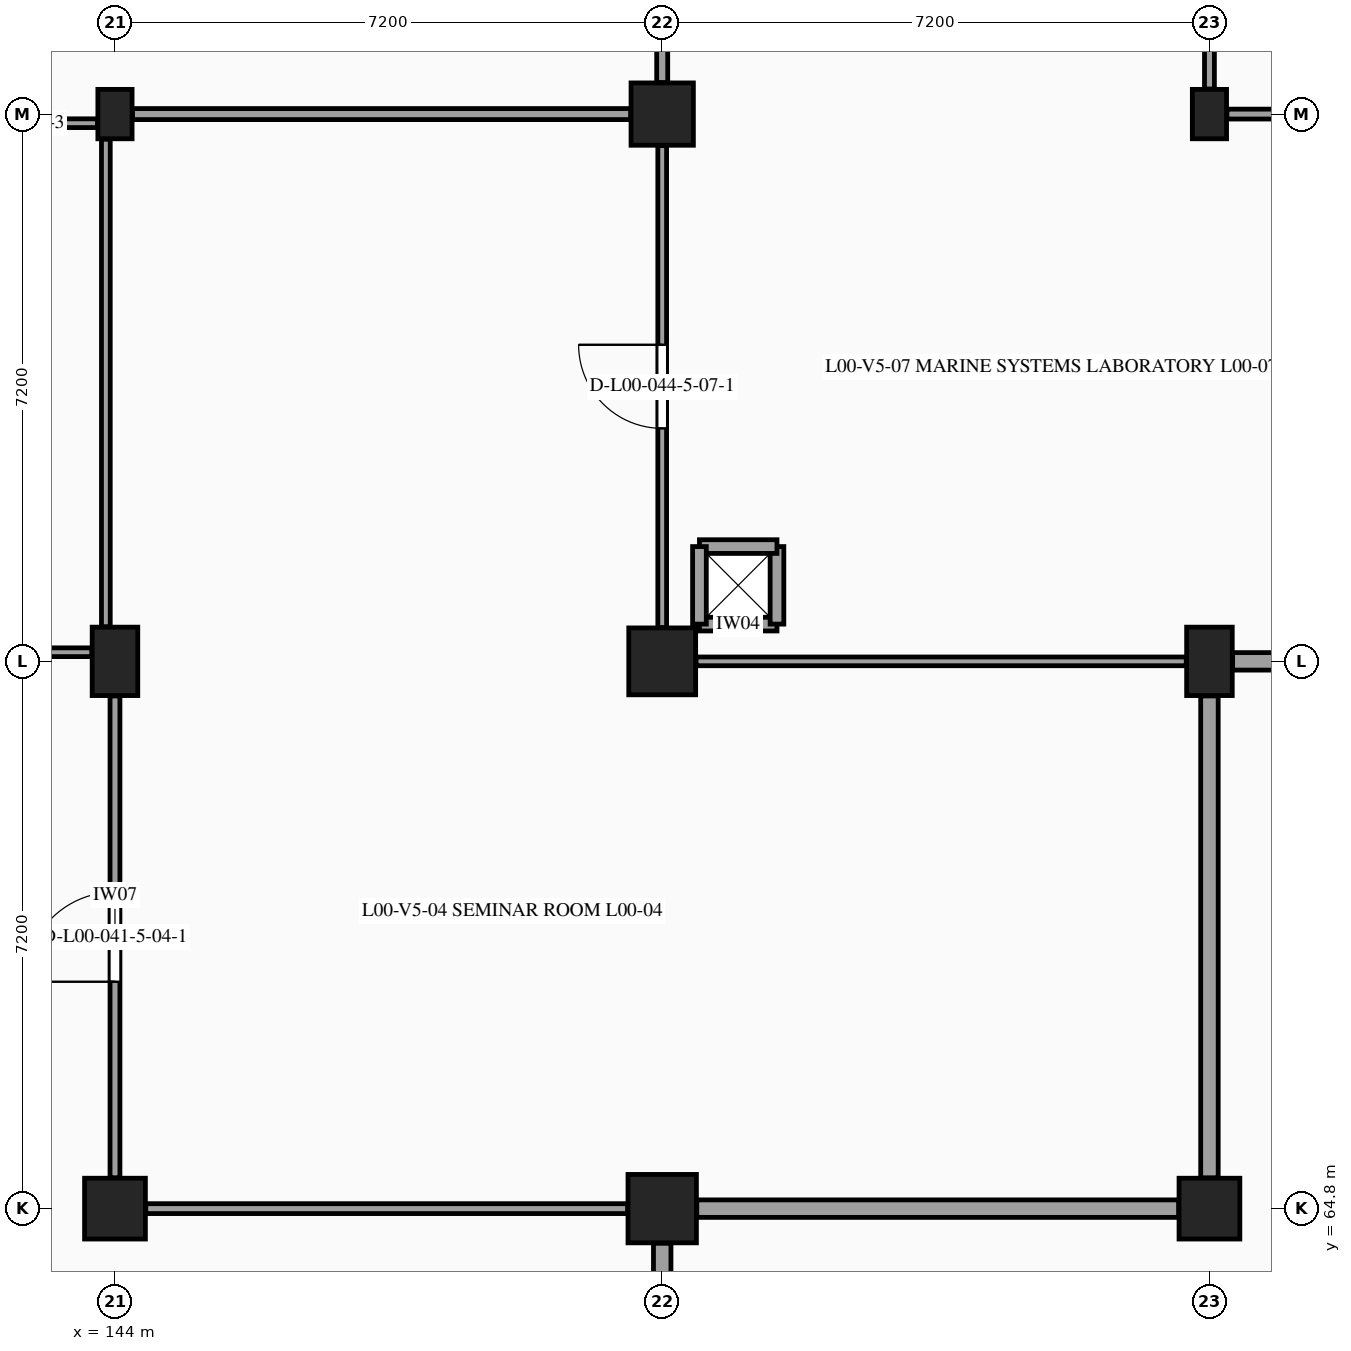
"""IFC4 building model, lengths in metres.
Left out: names, types, materials, properties, quantities, classifications, styles, units other than length and angle.
Written with IfcOpenShell. Run it as: python <this file> out.ifc"""

import sys

from ifc_helpers import new_model, si_unit, direction, frame, frame_2d, origin, origin_2d, place, context, subcontext, project, spatial, rectangle, extrude, element, fill, save


model = new_model("IFC4")
c1 = context("Model", 3, precision=1e-05, world=origin(), true_north=direction((0.0, 1.0)))
c2 = subcontext(c1, "Body", "Model", "MODEL_VIEW")
j1 = project(units=[si_unit("LENGTHUNIT", "METRE"), si_unit("PLANEANGLEUNIT", "RADIAN")], contexts=[c1])
p1 = place(None, origin())
s1 = spatial("IfcSite", under=j1, at=p1, CompositionType="ELEMENT")
p2 = place(p1, origin())
s2 = spatial("IfcBuilding", under=s1, at=p2, CompositionType="ELEMENT")
p3 = place(p2, origin())
s3 = spatial("IfcBuildingStorey", under=s2, at=p3, CompositionType="ELEMENT", Elevation=0.0)
p4 = place(p3, frame((144.0, 64.8, 0.0), z_axis=(0.0, 0.0, 1.0), x_axis=(1.0, 0.0, 0.0)))
e1 = element("IfcColumn", 1, at=p4, inside=s3, PredefinedType="COLUMN", context=c2, shape_type="SweptSolid", body=[
    extrude(rectangle(XDim=0.8, YDim=0.8, at=origin_2d()), origin(), (0.0, 0.0, 1.0), 5.4),
])
p5 = place(p3, frame((144.0, 72.0, 0.0), z_axis=(0.0, 0.0, 1.0), x_axis=(1.0, 0.0, 0.0)))
e2 = element("IfcColumn", 2, at=p5, inside=s3, PredefinedType="COLUMN", context=c2, shape_type="SweptSolid", body=[
    extrude(rectangle(XDim=0.6, YDim=0.9, at=origin_2d()), origin(), (0.0, 0.0, 1.0), 5.4),
])
p6 = place(p3, frame((144.0, 79.2, 0.0), z_axis=(0.0, 0.0, 1.0), x_axis=(1.0, 0.0, 0.0)))
e3 = element("IfcColumn", 3, at=p6, inside=s3, PredefinedType="PILASTER", context=c2, shape_type="SweptSolid", body=[
    extrude(rectangle(XDim=0.45, YDim=0.65, at=origin_2d()), origin(), (0.0, 0.0, 1.0), 5.4),
])
p7 = place(p3, frame((151.2, 64.8, 0.0), z_axis=(0.0, 0.0, 1.0), x_axis=(1.0, 0.0, 0.0)))
e4 = element("IfcColumn", 4, at=p7, inside=s3, PredefinedType="COLUMN", context=c2, shape_type="SweptSolid", body=[
    extrude(rectangle(XDim=0.9, YDim=0.9, at=origin_2d()), origin(), (0.0, 0.0, 1.0), 5.4),
])
p8 = place(p3, frame((151.2, 72.0, 0.0), z_axis=(0.0, 0.0, 1.0), x_axis=(1.0, 0.0, 0.0)))
e5 = element("IfcColumn", 5, at=p8, inside=s3, PredefinedType="COLUMN", context=c2, shape_type="SweptSolid", body=[
    extrude(rectangle(XDim=0.88, YDim=0.88, at=origin_2d()), origin(), (0.0, 0.0, 1.0), 5.4),
])
p9 = place(p3, frame((151.2, 79.2, 0.0), z_axis=(0.0, 0.0, 1.0), x_axis=(1.0, 0.0, 0.0)))
e6 = element("IfcColumn", 6, at=p9, inside=s3, PredefinedType="COLUMN", context=c2, shape_type="SweptSolid", body=[
    extrude(rectangle(XDim=0.82, YDim=0.82, at=origin_2d()), origin(), (0.0, 0.0, 1.0), 5.4),
])
p10 = place(p3, frame((158.4, 64.8, 0.0), z_axis=(0.0, 0.0, 1.0), x_axis=(1.0, 0.0, 0.0)))
e7 = element("IfcColumn", 7, at=p10, inside=s3, PredefinedType="COLUMN", context=c2, shape_type="SweptSolid", body=[
    extrude(rectangle(XDim=0.8, YDim=0.8, at=origin_2d()), origin(), (0.0, 0.0, 1.0), 5.4),
])
p11 = place(p3, frame((158.4, 72.0, 0.0), z_axis=(0.0, 0.0, 1.0), x_axis=(1.0, 0.0, 0.0)))
e8 = element("IfcColumn", 8, at=p11, inside=s3, PredefinedType="COLUMN", context=c2, shape_type="SweptSolid", body=[
    extrude(rectangle(XDim=0.6, YDim=0.9, at=origin_2d()), origin(), (0.0, 0.0, 1.0), 5.4),
])
p12 = place(p3, frame((158.4, 79.2, 0.0), z_axis=(0.0, 0.0, 1.0), x_axis=(1.0, 0.0, 0.0)))
e9 = element("IfcColumn", 9, at=p12, inside=s3, PredefinedType="PILASTER", context=c2, shape_type="SweptSolid", body=[
    extrude(rectangle(XDim=0.45, YDim=0.65, at=origin_2d()), origin(), (0.0, 0.0, 1.0), 5.4),
])
p13 = place(p3, frame((137.245, 72.12, 0.0), z_axis=(0.0, 0.0, 1.0), x_axis=(1.0, 0.0, 0.0)))
e10 = element("IfcWall", 10, at=p13, inside=s3, PredefinedType="PARTITIONING", context=c2, shape_type="SweptSolid", body=[
    extrude(rectangle(XDim=6.45, YDim=0.115, at=frame_2d((3.225, 0.0))), origin(), (0.0, 0.0, 1.0), 4.29),
])
p14 = place(p3, frame((137.215, 79.08, 0.0), z_axis=(0.0, 0.0, 1.0), x_axis=(1.0, 0.0, 0.0)))
e11 = element("IfcWall", 11, at=p14, inside=s3, PredefinedType="PARTITIONING", context=c2, shape_type="SweptSolid", body=[
    extrude(rectangle(XDim=6.555, YDim=0.115, at=frame_2d((3.277, 0.0))), origin(), (0.0, 0.0, 1.0), 4.29),
])
p15 = place(p14, frame((0.585, 0.0, 0.0)))
e12 = element("IfcOpeningElement", 12, at=p15, cuts=e11, PredefinedType="OPENING", context=c2, shape_type="SweptSolid", body=[
    extrude(rectangle(XDim=0.95, YDim=2.1, at=frame_2d((0.475, 1.05))), frame((0.0, 0.067, 0.0), z_axis=(0.0, -1.0, 0.0), x_axis=(1.0, 0.0, 0.0)), (0.0, 0.0, 1.0), 0.135),
])
p16 = place(p14, frame((2.685, 0.0, 0.0)))
e13 = element("IfcOpeningElement", 13, at=p16, cuts=e11, PredefinedType="OPENING", context=c2, shape_type="SweptSolid", body=[
    extrude(rectangle(XDim=0.95, YDim=2.1, at=frame_2d((0.475, 1.05))), frame((0.0, 0.067, 0.0), z_axis=(0.0, -1.0, 0.0), x_axis=(1.0, 0.0, 0.0)), (0.0, 0.0, 1.0), 0.135),
])
p17 = place(p14, frame((4.835, 0.0, 0.0)))
e14 = element("IfcOpeningElement", 14, at=p17, cuts=e11, PredefinedType="OPENING", context=c2, shape_type="SweptSolid", body=[
    extrude(rectangle(XDim=1.0, YDim=2.15, at=frame_2d((0.5, 1.075))), frame((0.0, 0.067, 0.0), z_axis=(0.0, -1.0, 0.0), x_axis=(1.0, 0.0, 0.0)), (0.0, 0.0, 1.0), 0.135),
])
p18 = place(p3, frame((143.88, 72.455, 0.0), z_axis=(0.0, 0.0, 1.0), x_axis=(0.0, 1.0, 0.0)))
e15 = element("IfcWall", 15, at=p18, inside=s3, PredefinedType="PARTITIONING", context=c2, shape_type="SweptSolid", body=[
    extrude(rectangle(XDim=6.415, YDim=0.115, at=frame_2d((3.208, 0.0))), origin(), (0.0, 0.0, 1.0), 4.4),
])
for number, where, z_axis, x_axis in (
    (16, (151.69, 72.49, 0.0), (0.0, 0.0, 1.0), (1.0, 0.0, 0.0)),
    (17, (152.71, 72.49, 0.0), (0.0, 0.0, 1.0), (0.0, 1.0, 0.0)),
    (18, (152.71, 73.51, 0.0), (0.0, 0.0, 1.0), (-1.0, 0.0, 0.0)),
    (19, (151.69, 73.51, 0.0), (0.0, 0.0, 1.0), (0.0, -1.0, 0.0)),
):
    element("IfcWall", number, at=place(p3, frame(where, z_axis=z_axis, x_axis=x_axis)), inside=s3, PredefinedType="PARTITIONING", context=c2, shape_type="SweptSolid", body=[
        extrude(rectangle(XDim=1.02, YDim=0.18, at=frame_2d((0.51, 0.0))), origin(), (0.0, 0.0, 1.0), 5.09),
    ])
p19 = place(p3, frame((144.0, 65.205, 0.0), z_axis=(0.0, 0.0, 1.0), x_axis=(0.0, 1.0, 0.0)))
e20 = element("IfcWall", 20, at=p19, inside=s3, PredefinedType="PARTITIONING", context=c2, shape_type="SweptSolid", body=[
    extrude(rectangle(XDim=6.34, YDim=0.13, at=frame_2d((3.17, 0.0))), origin(), (0.0, 0.0, 1.0), 4.405),
])
p20 = place(p19, frame((2.58, 0.0, 0.0)))
e21 = element("IfcOpeningElement", 21, at=p20, cuts=e20, PredefinedType="OPENING", context=c2, shape_type="SweptSolid", body=[
    extrude(rectangle(XDim=1.18, YDim=2.18, at=frame_2d((0.59, 1.09))), frame((0.0, 0.075, 0.0), z_axis=(0.0, -1.0, 0.0), x_axis=(1.0, 0.0, 0.0)), (0.0, 0.0, 1.0), 0.15),
])
p21 = place(p3, frame((151.2, 58.13, 0.0), z_axis=(0.0, 0.0, 1.0), x_axis=(0.0, 1.0, 0.0)))
e22 = element("IfcWall", 22, at=p21, inside=s3, PredefinedType="PARTITIONING", context=c2, shape_type="SweptSolid", body=[
    extrude(rectangle(XDim=6.215, YDim=0.23, at=frame_2d((3.107, 0.0))), origin(), (0.0, 0.0, 1.0), 4.405),
])
p22 = place(p3, frame((144.405, 64.8, 0.0), z_axis=(0.0, 0.0, 1.0), x_axis=(1.0, 0.0, 0.0)))
e23 = element("IfcWall", 23, at=p22, inside=s3, PredefinedType="PARTITIONING", context=c2, shape_type="SweptSolid", body=[
    extrude(rectangle(XDim=6.34, YDim=0.13, at=frame_2d((3.17, 0.0))), origin(), (0.0, 0.0, 1.0), 4.31),
])
p23 = place(p3, frame((151.2, 72.445, 0.0), z_axis=(0.0, 0.0, 1.0), x_axis=(0.0, 1.0, 0.0)))
e24 = element("IfcWall", 24, at=p23, inside=s3, PredefinedType="PARTITIONING", context=c2, shape_type="SweptSolid", body=[
    extrude(rectangle(XDim=6.34, YDim=0.115, at=frame_2d((3.17, 0.0))), origin(), (0.0, 0.0, 1.0), 4.4),
])
p24 = place(p23, frame((2.62, 0.0, 0.0)))
e25 = element("IfcOpeningElement", 25, at=p24, cuts=e24, PredefinedType="OPENING", context=c2, shape_type="SweptSolid", body=[
    extrude(rectangle(XDim=1.1, YDim=2.15, at=frame_2d((0.55, 1.075))), frame((0.0, 0.067, 0.0), z_axis=(0.0, -1.0, 0.0), x_axis=(1.0, 0.0, 0.0)), (0.0, 0.0, 1.0), 0.135),
])
p25 = place(p3, frame((144.23, 79.2, 0.0), z_axis=(0.0, 0.0, 1.0), x_axis=(1.0, 0.0, 0.0)))
e26 = element("IfcWall", 26, at=p25, inside=s3, PredefinedType="PARTITIONING", context=c2, shape_type="SweptSolid", body=[
    extrude(rectangle(XDim=6.555, YDim=0.145, at=frame_2d((3.277, 0.0))), origin(), (0.0, 0.0, 1.0), 4.31),
])
p26 = place(p3, frame((151.2, 79.615, 0.0), z_axis=(0.0, 0.0, 1.0), x_axis=(0.0, 1.0, 0.0)))
e27 = element("IfcWall", 27, at=p26, inside=s3, PredefinedType="PARTITIONING", context=c2, shape_type="SweptSolid", body=[
    extrude(rectangle(XDim=6.38, YDim=0.145, at=frame_2d((3.19, 0.0))), origin(), (0.0, 0.0, 1.0), 4.395),
])
p27 = place(p3, frame((151.655, 64.8, 0.0), z_axis=(0.0, 0.0, 1.0), x_axis=(1.0, 0.0, 0.0)))
e28 = element("IfcWall", 28, at=p27, inside=s3, PredefinedType="PARTITIONING", context=c2, shape_type="SweptSolid", body=[
    extrude(rectangle(XDim=6.34, YDim=0.23, at=frame_2d((3.17, 0.0))), origin(), (0.0, 0.0, 1.0), 4.34),
])
p28 = place(p3, frame((158.4, 65.205, 0.0), z_axis=(0.0, 0.0, 1.0), x_axis=(0.0, 1.0, 0.0)))
e29 = element("IfcWall", 29, at=p28, inside=s3, PredefinedType="PARTITIONING", context=c2, shape_type="SweptSolid", body=[
    extrude(rectangle(XDim=6.34, YDim=0.23, at=frame_2d((3.17, 0.0))), origin(), (0.0, 0.0, 1.0), 4.405),
])
p29 = place(p3, frame((151.645, 72.0, 0.0), z_axis=(0.0, 0.0, 1.0), x_axis=(1.0, 0.0, 0.0)))
e30 = element("IfcWall", 30, at=p29, inside=s3, PredefinedType="PARTITIONING", context=c2, shape_type="SweptSolid", body=[
    extrude(rectangle(XDim=6.45, YDim=0.115, at=frame_2d((3.225, 0.0))), origin(), (0.0, 0.0, 1.0), 4.34),
])
p30 = place(p3, frame((158.4, 79.53, 0.0), z_axis=(0.0, 0.0, 1.0), x_axis=(0.0, 1.0, 0.0)))
e31 = element("IfcWall", 31, at=p30, inside=s3, PredefinedType="PARTITIONING", context=c2, shape_type="SweptSolid", body=[
    extrude(rectangle(XDim=6.415, YDim=0.13, at=frame_2d((3.208, 0.0))), origin(), (0.0, 0.0, 1.0), 4.395),
])
p31 = place(p30, frame((2.248, 0.0, 0.0)))
e32 = element("IfcOpeningElement", 32, at=p31, cuts=e31, PredefinedType="OPENING", context=c2, shape_type="SweptSolid", body=[
    extrude(rectangle(XDim=1.92, YDim=2.35, at=frame_2d((0.96, 1.175))), frame((0.0, 0.075, 0.0), z_axis=(0.0, -1.0, 0.0), x_axis=(1.0, 0.0, 0.0)), (0.0, 0.0, 1.0), 0.15),
])
p32 = place(p3, frame((158.705, 72.0, 0.0), z_axis=(0.0, 0.0, 1.0), x_axis=(1.0, 0.0, 0.0)))
e33 = element("IfcWall", 33, at=p32, inside=s3, PredefinedType="PARTITIONING", context=c2, shape_type="SweptSolid", body=[
    extrude(rectangle(XDim=6.45, YDim=0.23, at=frame_2d((3.225, 0.0))), origin(), (0.0, 0.0, 1.0), 4.35),
])
p33 = place(p3, frame((158.63, 79.2, 0.0), z_axis=(0.0, 0.0, 1.0), x_axis=(1.0, 0.0, 0.0)))
e34 = element("IfcWall", 34, at=p33, inside=s3, PredefinedType="PARTITIONING", context=c2, shape_type="SweptSolid", body=[
    extrude(rectangle(XDim=6.555, YDim=0.13, at=frame_2d((3.278, 0.0))), origin(), (0.0, 0.0, 1.0), 4.35),
])
p34 = place(p20, origin())
e35 = element("IfcDoor", 35, at=p34, inside=s3, OperationType="SINGLE_SWING_LEFT", PredefinedType="DOOR", context=c2, shape_type="SweptSolid", body=[
    extrude(rectangle(XDim=1.18, YDim=2.18, at=frame_2d((0.59, 1.09))), frame((0.0, 0.025, 0.0), z_axis=(0.0, -1.0, 0.0), x_axis=(1.0, 0.0, 0.0)), (0.0, 0.0, 1.0), 0.05),
])
fill(e21, e35)
p35 = place(p24, origin())
e36 = element("IfcDoor", 36, at=p35, inside=s3, OperationType="SINGLE_SWING_RIGHT", PredefinedType="DOOR", context=c2, shape_type="SweptSolid", body=[
    extrude(rectangle(XDim=1.1, YDim=2.15, at=frame_2d((0.55, 1.075))), frame((0.0, 0.025, 0.0), z_axis=(0.0, -1.0, 0.0), x_axis=(1.0, 0.0, 0.0)), (0.0, 0.0, 1.0), 0.05),
])
fill(e25, e36)
save(model, sys.argv[1])
